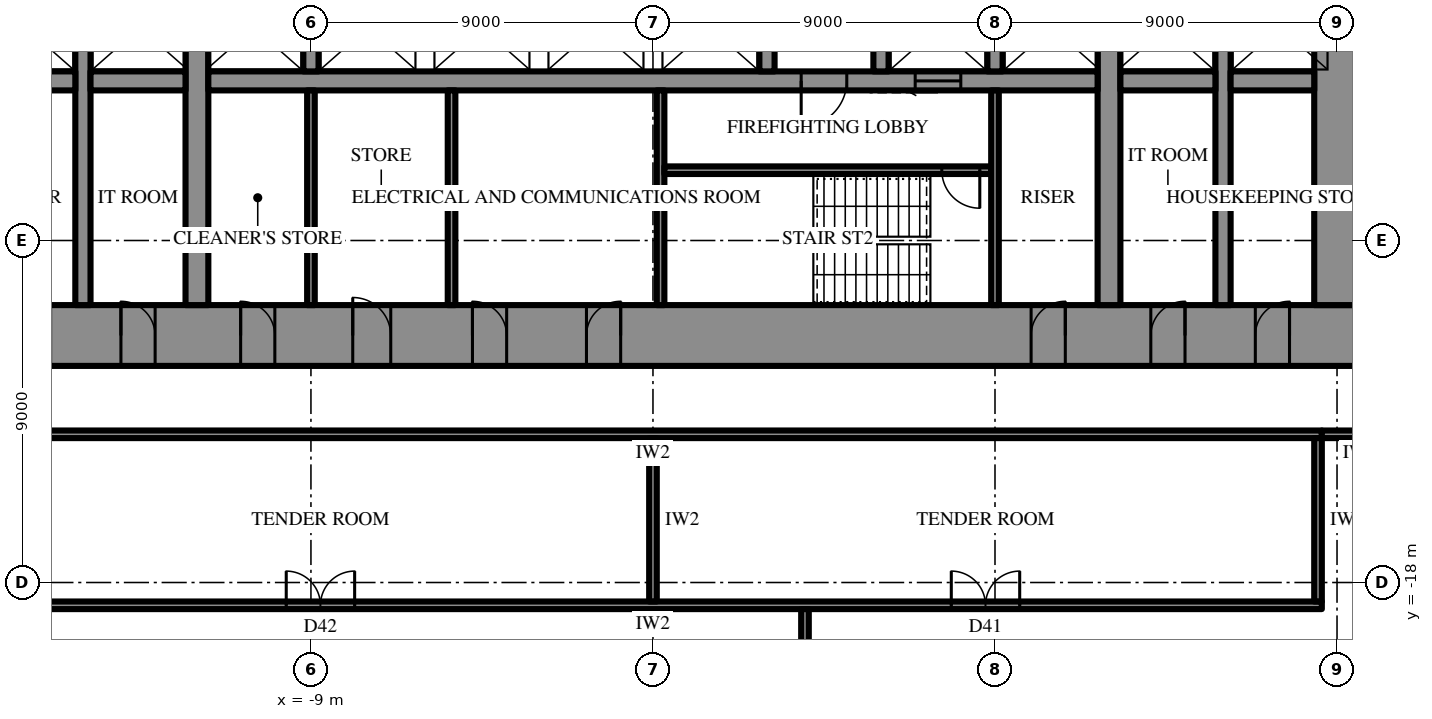
"""IFC4 building model, lengths in metres.
Left out: names, types, materials, properties, quantities, classifications, styles, units other than length and angle.
Written with IfcOpenShell. Run it as: python <this file> out.ifc"""

import sys

from ifc_helpers import new_model, si_unit, direction, frame, frame_2d, origin, place, context, subcontext, project, spatial, rectangle, extrude, element, fill, save


model = new_model("IFC4")
c1 = context("Model", 3, precision=1e-05, world=origin(), true_north=direction((0.0, 1.0)))
c2 = subcontext(c1, "Body", "Model", "MODEL_VIEW")
j1 = project(units=[si_unit("LENGTHUNIT", "METRE"), si_unit("PLANEANGLEUNIT", "RADIAN")], contexts=[c1])
p1 = place(None, origin())
s1 = spatial("IfcSite", under=j1, at=p1, CompositionType="ELEMENT")
p2 = place(p1, origin())
s2 = spatial("IfcBuilding", under=s1, at=p2, CompositionType="ELEMENT")
p3 = place(p2, frame((0.0, 0.0, 69.7)))
s3 = spatial("IfcBuildingStorey", under=s2, at=p3, CompositionType="ELEMENT", Elevation=69.7)
p4 = place(p3, frame((18.6, -11.5, 0.0), z_axis=(0.0, 0.0, 1.0), x_axis=(-1.0, 0.0, 0.0)))
e1 = element("IfcWall", 1, at=p4, inside=s3, PredefinedType="SHEAR", context=c2, shape_type="SweptSolid", body=[
    extrude(rectangle(XDim=37.2, YDim=1.6, at=frame_2d((18.6, 0.0))), origin(), (0.0, 0.0, 1.0), 4.2),
])
p5 = place(p4, frame((19.45, 0.0, 0.0)))
e2 = element("IfcOpeningElement", 2, at=p5, cuts=e1, PredefinedType="OPENING", context=c2, shape_type="SweptSolid", body=[
    extrude(rectangle(XDim=0.9, YDim=2.2, at=frame_2d((0.45, 1.1))), frame((0.0, 0.81, 0.0), z_axis=(0.0, -1.0, 0.0), x_axis=(1.0, 0.0, 0.0)), (0.0, 0.0, 1.0), 1.62),
])
p6 = place(p4, frame((22.45, 0.0, 0.0)))
e3 = element("IfcOpeningElement", 3, at=p6, cuts=e1, PredefinedType="OPENING", context=c2, shape_type="SweptSolid", body=[
    extrude(rectangle(XDim=0.9, YDim=2.2, at=frame_2d((0.45, 1.1))), frame((0.0, 0.81, 0.0), z_axis=(0.0, -1.0, 0.0), x_axis=(1.0, 0.0, 0.0)), (0.0, 0.0, 1.0), 1.62),
])
p7 = place(p4, frame((25.5, 0.0, 0.0)))
e4 = element("IfcOpeningElement", 4, at=p7, cuts=e1, PredefinedType="OPENING", context=c2, shape_type="SweptSolid", body=[
    extrude(rectangle(XDim=1.0, YDim=2.2, at=frame_2d((0.5, 1.1))), frame((0.0, 0.81, 0.0), z_axis=(0.0, -1.0, 0.0), x_axis=(1.0, 0.0, 0.0)), (0.0, 0.0, 1.0), 1.62),
])
p8 = place(p4, frame((1.85, 0.0, 0.0)))
e5 = element("IfcOpeningElement", 5, at=p8, cuts=e1, PredefinedType="OPENING", context=c2, shape_type="SweptSolid", body=[
    extrude(rectangle(XDim=0.9, YDim=2.2, at=frame_2d((0.45, 1.1))), frame((0.0, 0.81, 0.0), z_axis=(0.0, -1.0, 0.0), x_axis=(1.0, 0.0, 0.0)), (0.0, 0.0, 1.0), 1.62),
])
p9 = place(p4, frame((4.6, 0.0, 0.0)))
e6 = element("IfcOpeningElement", 6, at=p9, cuts=e1, PredefinedType="OPENING", context=c2, shape_type="SweptSolid", body=[
    extrude(rectangle(XDim=0.9, YDim=2.2, at=frame_2d((0.45, 1.1))), frame((0.0, 0.81, 0.0), z_axis=(0.0, -1.0, 0.0), x_axis=(1.0, 0.0, 0.0)), (0.0, 0.0, 1.0), 1.62),
])
p10 = place(p4, frame((7.75, 0.0, 0.0)))
e7 = element("IfcOpeningElement", 7, at=p10, cuts=e1, PredefinedType="OPENING", context=c2, shape_type="SweptSolid", body=[
    extrude(rectangle(XDim=0.9, YDim=2.2, at=frame_2d((0.45, 1.1))), frame((0.0, 0.81, 0.0), z_axis=(0.0, -1.0, 0.0), x_axis=(1.0, 0.0, 0.0)), (0.0, 0.0, 1.0), 1.62),
])
p11 = place(p4, frame((28.55, 0.0, 0.0)))
e8 = element("IfcOpeningElement", 8, at=p11, cuts=e1, PredefinedType="OPENING", context=c2, shape_type="SweptSolid", body=[
    extrude(rectangle(XDim=0.9, YDim=2.2, at=frame_2d((0.45, 1.1))), frame((0.0, 0.81, 0.0), z_axis=(0.0, -1.0, 0.0), x_axis=(1.0, 0.0, 0.0)), (0.0, 0.0, 1.0), 1.62),
])
p12 = place(p4, frame((31.7, 0.0, 0.0)))
e9 = element("IfcOpeningElement", 9, at=p12, cuts=e1, PredefinedType="OPENING", context=c2, shape_type="SweptSolid", body=[
    extrude(rectangle(XDim=0.9, YDim=2.2, at=frame_2d((0.45, 1.1))), frame((0.0, 0.81, 0.0), z_axis=(0.0, -1.0, 0.0), x_axis=(1.0, 0.0, 0.0)), (0.0, 0.0, 1.0), 1.62),
])
p13 = place(p4, frame((34.45, 0.0, 0.0)))
e10 = element("IfcOpeningElement", 10, at=p13, cuts=e1, PredefinedType="OPENING", context=c2, shape_type="SweptSolid", body=[
    extrude(rectangle(XDim=0.9, YDim=2.2, at=frame_2d((0.45, 1.1))), frame((0.0, 0.81, 0.0), z_axis=(0.0, -1.0, 0.0), x_axis=(1.0, 0.0, 0.0)), (0.0, 0.0, 1.0), 1.62),
])
p14 = place(p3, frame((18.0, -10.7, 0.0), z_axis=(0.0, 0.0, 1.0), x_axis=(0.0, 1.0, 0.0)))
e11 = element("IfcWall", 11, at=p14, inside=s3, PredefinedType="SHEAR", context=c2, shape_type="SweptSolid", body=[
    extrude(rectangle(XDim=21.4, YDim=1.2, at=frame_2d((10.7, 0.0))), origin(), (0.0, 0.0, 1.0), 4.2),
])
p15 = place(p14, frame((9.8, 0.0, 0.0)))
e12 = element("IfcOpeningElement", 12, at=p15, cuts=e11, PredefinedType="OPENING", context=c2, shape_type="SweptSolid", body=[
    extrude(rectangle(XDim=1.8, YDim=2.4, at=frame_2d((0.9, 1.2))), frame((0.0, 0.61, 0.0), z_axis=(0.0, -1.0, 0.0), x_axis=(1.0, 0.0, 0.0)), (0.0, 0.0, 1.0), 1.22),
])
p16 = place(p3, frame((12.0, -10.7, 0.0), z_axis=(0.0, 0.0, 1.0), x_axis=(0.0, 1.0, 0.0)))
e13 = element("IfcWall", 13, at=p16, inside=s3, PredefinedType="SHEAR", context=c2, shape_type="SweptSolid", body=[
    extrude(rectangle(XDim=21.4, YDim=0.6, at=frame_2d((10.7, 0.0))), origin(), (0.0, 0.0, 1.0), 4.2),
])
p17 = place(p16, frame((9.8, 0.0, 0.0)))
e14 = element("IfcOpeningElement", 14, at=p17, cuts=e13, PredefinedType="OPENING", context=c2, shape_type="SweptSolid", body=[
    extrude(rectangle(XDim=1.8, YDim=2.4, at=frame_2d((0.9, 1.2))), frame((0.0, 0.31, 0.0), z_axis=(0.0, -1.0, 0.0), x_axis=(1.0, 0.0, 0.0)), (0.0, 0.0, 1.0), 0.62),
])
p18 = place(p3, frame((-12.0, -10.7, 0.0), z_axis=(0.0, 0.0, 1.0), x_axis=(0.0, 1.0, 0.0)))
e15 = element("IfcWall", 15, at=p18, inside=s3, PredefinedType="SHEAR", context=c2, shape_type="SweptSolid", body=[
    extrude(rectangle(XDim=21.4, YDim=0.6, at=frame_2d((10.7, 0.0))), origin(), (0.0, 0.0, 1.0), 4.2),
])
p19 = place(p18, frame((9.8, 0.0, 0.0)))
e16 = element("IfcOpeningElement", 16, at=p19, cuts=e15, PredefinedType="OPENING", context=c2, shape_type="SweptSolid", body=[
    extrude(rectangle(XDim=1.8, YDim=2.4, at=frame_2d((0.9, 1.2))), frame((0.0, 0.31, 0.0), z_axis=(0.0, -1.0, 0.0), x_axis=(1.0, 0.0, 0.0)), (0.0, 0.0, 1.0), 0.62),
])
p20 = place(p3, frame((15.0, -10.7, 0.0), z_axis=(0.0, 0.0, 1.0), x_axis=(0.0, 1.0, 0.0)))
e17 = element("IfcWall", 17, at=p20, inside=s3, PredefinedType="SHEAR", context=c2, shape_type="SweptSolid", body=[
    extrude(rectangle(XDim=21.4, YDim=0.4, at=frame_2d((10.7, 0.0))), origin(), (0.0, 0.0, 1.0), 4.2),
])
p21 = place(p20, frame((9.8, 0.0, 0.0)))
e18 = element("IfcOpeningElement", 18, at=p21, cuts=e17, PredefinedType="OPENING", context=c2, shape_type="SweptSolid", body=[
    extrude(rectangle(XDim=1.8, YDim=2.4, at=frame_2d((0.9, 1.2))), frame((0.0, 0.21, 0.0), z_axis=(0.0, -1.0, 0.0), x_axis=(1.0, 0.0, 0.0)), (0.0, 0.0, 1.0), 0.42),
])
p22 = place(p3, frame((-15.0, -10.7, 0.0), z_axis=(0.0, 0.0, 1.0), x_axis=(0.0, 1.0, 0.0)))
e19 = element("IfcWall", 19, at=p22, inside=s3, PredefinedType="SHEAR", context=c2, shape_type="SweptSolid", body=[
    extrude(rectangle(XDim=21.4, YDim=0.4, at=frame_2d((10.7, 0.0))), origin(), (0.0, 0.0, 1.0), 4.2),
])
p23 = place(p22, frame((9.8, 0.0, 0.0)))
e20 = element("IfcOpeningElement", 20, at=p23, cuts=e19, PredefinedType="OPENING", context=c2, shape_type="SweptSolid", body=[
    extrude(rectangle(XDim=1.8, YDim=2.4, at=frame_2d((0.9, 1.2))), frame((0.0, 0.21, 0.0), z_axis=(0.0, -1.0, 0.0), x_axis=(1.0, 0.0, 0.0)), (0.0, 0.0, 1.0), 0.42),
])
p24 = place(p3, frame((17.4, -4.8, 0.0), z_axis=(0.0, 0.0, 1.0), x_axis=(-1.0, 0.0, 0.0)))
e21 = element("IfcWall", 21, at=p24, inside=s3, PredefinedType="SHEAR", context=c2, shape_type="SweptSolid", body=[
    extrude(rectangle(XDim=2.2, YDim=0.5, at=frame_2d((1.1, 0.0))), origin(), (0.0, 0.0, 1.0), 4.2),
])
p25 = place(p3, frame((14.8, -4.8, 0.0), z_axis=(0.0, 0.0, 1.0), x_axis=(-1.0, 0.0, 0.0)))
e22 = element("IfcWall", 22, at=p25, inside=s3, PredefinedType="SHEAR", context=c2, shape_type="SweptSolid", body=[
    extrude(rectangle(XDim=2.5, YDim=0.5, at=frame_2d((1.25, 0.0))), origin(), (0.0, 0.0, 1.0), 4.2),
])
p26 = place(p3, frame((11.7, -4.8, 0.0), z_axis=(0.0, 0.0, 1.0), x_axis=(-1.0, 0.0, 0.0)))
e23 = element("IfcWall", 23, at=p26, inside=s3, PredefinedType="SHEAR", context=c2, shape_type="SweptSolid", body=[
    extrude(rectangle(XDim=23.4, YDim=0.5, at=frame_2d((11.7, 0.0))), origin(), (0.0, 0.0, 1.0), 4.2),
])
p27 = place(p26, frame((6.6, 0.0, 0.0)))
e24 = element("IfcOpeningElement", 24, at=p27, cuts=e23, PredefinedType="OPENING", context=c2, shape_type="SweptSolid", body=[
    extrude(rectangle(XDim=1.2, YDim=2.2, at=frame_2d((0.6, 1.1))), frame((0.0, 0.26, 0.0), z_axis=(0.0, -1.0, 0.0), x_axis=(1.0, 0.0, 0.0)), (0.0, 0.0, 1.0), 0.52),
])
p28 = place(p26, frame((3.6, 0.0, 0.0)))
e25 = element("IfcOpeningElement", 25, at=p28, cuts=e23, PredefinedType="OPENING", context=c2, shape_type="SweptSolid", body=[
    extrude(rectangle(XDim=1.2, YDim=2.2, at=frame_2d((0.6, 1.1))), frame((0.0, 0.26, 0.0), z_axis=(0.0, -1.0, 0.0), x_axis=(1.0, 0.0, 0.0)), (0.0, 0.0, 1.0), 0.52),
])
p29 = place(p3, frame((-12.3, -4.8, 0.0), z_axis=(0.0, 0.0, 1.0), x_axis=(-1.0, 0.0, 0.0)))
e26 = element("IfcWall", 26, at=p29, inside=s3, PredefinedType="SHEAR", context=c2, shape_type="SweptSolid", body=[
    extrude(rectangle(XDim=2.5, YDim=0.5, at=frame_2d((1.25, 0.0))), origin(), (0.0, 0.0, 1.0), 4.2),
])
p30 = place(p3, frame((-15.2, -4.8, 0.0), z_axis=(0.0, 0.0, 1.0), x_axis=(-1.0, 0.0, 0.0)))
e27 = element("IfcWall", 27, at=p30, inside=s3, PredefinedType="SHEAR", context=c2, shape_type="SweptSolid", body=[
    extrude(rectangle(XDim=2.2, YDim=0.5, at=frame_2d((1.1, 0.0))), origin(), (0.0, 0.0, 1.0), 4.2),
])
for number, where, z_axis, x_axis in (
    (28, (9.0, -2.25, 0.0), (0.0, 0.0, 1.0), (0.0, -1.0, 0.0)),
    (29, (6.0, -2.25, 0.0), (0.0, 0.0, 1.0), (0.0, -1.0, 0.0)),
    (30, (3.0, -2.25, 0.0), (0.0, 0.0, 1.0), (0.0, -1.0, 0.0)),
    (31, (-9.0, -2.25, 0.0), (0.0, 0.0, 1.0), (0.0, -1.0, 0.0)),
):
    element("IfcWall", number, at=place(p3, frame(where, z_axis=z_axis, x_axis=x_axis)), inside=s3, PredefinedType="SHEAR", context=c2, shape_type="SweptSolid", body=[
        extrude(rectangle(XDim=2.3, YDim=0.4, at=frame_2d((1.15, 0.0))), origin(), (0.0, 0.0, 1.0), 4.2),
    ])
p31 = place(p3, frame((0.2, -5.05, 0.0), z_axis=(0.0, 0.0, 1.0), x_axis=(0.0, -1.0, 0.0)))
e32 = element("IfcWall", 32, at=p31, inside=s3, PredefinedType="SHEAR", context=c2, shape_type="SweptSolid", body=[
    extrude(rectangle(XDim=5.65, YDim=0.2, at=frame_2d((2.825, 0.0))), origin(), (0.0, 0.0, 1.0), 4.2),
])
p32 = place(p3, frame((8.9, -7.15, 0.0), z_axis=(0.0, 0.0, 1.0), x_axis=(-1.0, 0.0, 0.0)))
e33 = element("IfcWall", 33, at=p32, inside=s3, PredefinedType="SHEAR", context=c2, shape_type="SweptSolid", body=[
    extrude(rectangle(XDim=8.6, YDim=0.2, at=frame_2d((4.3, 0.0))), origin(), (0.0, 0.0, 1.0), 4.2),
])
p33 = place(p32, frame((0.3, 0.0, 0.0)))
e34 = element("IfcOpeningElement", 34, at=p33, cuts=e33, PredefinedType="OPENING", context=c2, shape_type="SweptSolid", body=[
    extrude(rectangle(XDim=1.0, YDim=2.2, at=frame_2d((0.5, 1.1))), frame((0.0, 0.11, 0.0), z_axis=(0.0, -1.0, 0.0), x_axis=(1.0, 0.0, 0.0)), (0.0, 0.0, 1.0), 0.22),
])
for number, where, z_axis, x_axis in (
    (35, (9.0, -5.05, 0.0), (0.0, 0.0, 1.0), (0.0, -1.0, 0.0)),
    (36, (-9.0, -5.05, 0.0), (0.0, 0.0, 1.0), (0.0, -1.0, 0.0)),
    (37, (-5.3, -5.05, 0.0), (0.0, 0.0, 1.0), (0.0, -1.0, 0.0)),
):
    element("IfcWall", number, at=place(p3, frame(where, z_axis=z_axis, x_axis=x_axis)), inside=s3, PredefinedType="PARTITIONING", context=c2, shape_type="SweptSolid", body=[
        extrude(rectangle(XDim=5.65, YDim=0.2, at=frame_2d((2.825, 0.0))), origin(), (0.0, 0.0, 1.0), 4.0),
    ])
p34 = place(p3, frame((17.6, -14.1, 0.0), z_axis=(0.0, 0.0, 1.0), x_axis=(-1.0, 0.0, 0.0)))
e38 = element("IfcWall", 38, at=p34, inside=s3, PredefinedType="PARTITIONING", context=c2, shape_type="SweptSolid", body=[
    extrude(rectangle(XDim=35.2, YDim=0.2, at=frame_2d((17.6, 0.0))), origin(), (0.0, 0.0, 1.0), 4.0),
])
p35 = place(p3, frame((17.6, -18.6, 0.0), z_axis=(0.0, 0.0, 1.0), x_axis=(-1.0, 0.0, 0.0)))
e39 = element("IfcWall", 39, at=p35, inside=s3, PredefinedType="PARTITIONING", context=c2, shape_type="SweptSolid", body=[
    extrude(rectangle(XDim=35.2, YDim=0.2, at=frame_2d((17.6, 0.0))), origin(), (0.0, 0.0, 1.0), 4.0),
])
p36 = place(p35, frame((7.95, 0.0, 0.0)))
e40 = element("IfcOpeningElement", 40, at=p36, cuts=e39, PredefinedType="OPENING", context=c2, shape_type="SweptSolid", body=[
    extrude(rectangle(XDim=1.8, YDim=2.4, at=frame_2d((0.9, 1.2))), frame((0.0, 0.11, 0.0), z_axis=(0.0, -1.0, 0.0), x_axis=(1.0, 0.0, 0.0)), (0.0, 0.0, 1.0), 0.22),
])
p37 = place(p35, frame((25.45, 0.0, 0.0)))
e41 = element("IfcOpeningElement", 41, at=p37, cuts=e39, PredefinedType="OPENING", context=c2, shape_type="SweptSolid", body=[
    extrude(rectangle(XDim=1.8, YDim=2.4, at=frame_2d((0.9, 1.2))), frame((0.0, 0.11, 0.0), z_axis=(0.0, -1.0, 0.0), x_axis=(1.0, 0.0, 0.0)), (0.0, 0.0, 1.0), 0.22),
])
p38 = place(p3, frame((17.5, -14.2, 0.0), z_axis=(0.0, 0.0, 1.0), x_axis=(0.0, -1.0, 0.0)))
e42 = element("IfcWall", 42, at=p38, inside=s3, PredefinedType="PARTITIONING", context=c2, shape_type="SweptSolid", body=[
    extrude(rectangle(XDim=4.3, YDim=0.2, at=frame_2d((2.15, 0.0))), origin(), (0.0, 0.0, 1.0), 4.0),
])
p39 = place(p3, frame((0.0, -14.2, 0.0), z_axis=(0.0, 0.0, 1.0), x_axis=(0.0, -1.0, 0.0)))
e43 = element("IfcWall", 43, at=p39, inside=s3, PredefinedType="PARTITIONING", context=c2, shape_type="SweptSolid", body=[
    extrude(rectangle(XDim=4.3, YDim=0.2, at=frame_2d((2.15, 0.0))), origin(), (0.0, 0.0, 1.0), 2.944),
])
p40 = place(p3, frame((19.6, -14.1, 0.0), z_axis=(0.0, 0.0, 1.0), x_axis=(-1.0, 0.0, 0.0)))
e44 = element("IfcWall", 44, at=p40, inside=s3, PredefinedType="PARTITIONING", context=c2, shape_type="SweptSolid", body=[
    extrude(rectangle(XDim=2.0, YDim=0.2, at=frame_2d((1.0, 0.0))), origin(), (0.0, 0.0, 1.0), 4.0),
])
p41 = place(p3, frame((4.0, -18.7, 0.0), z_axis=(0.0, 0.0, 1.0), x_axis=(0.0, -1.0, 0.0)))
e45 = element("IfcWall", 45, at=p41, inside=s3, PredefinedType="PARTITIONING", context=c2, shape_type="SweptSolid", body=[
    extrude(rectangle(XDim=15.1, YDim=0.2, at=frame_2d((7.55, 0.0))), origin(), (0.0, 0.0, 1.0), 4.0),
])
p42 = place(p41, frame((1.01, 0.0, 0.0)))
e46 = element("IfcOpeningElement", 46, at=p42, cuts=e45, PredefinedType="OPENING", context=c2, shape_type="SweptSolid", body=[
    extrude(rectangle(XDim=1.0, YDim=2.2, at=frame_2d((0.5, 1.1))), frame((0.0, 0.11, 0.0), z_axis=(0.0, -1.0, 0.0), x_axis=(1.0, 0.0, 0.0)), (0.0, 0.0, 1.0), 0.22),
])
p43 = place(p27, origin())
e47 = element("IfcDoor", 47, at=p43, inside=s3, OperationType="SINGLE_SWING_LEFT", PredefinedType="DOOR", context=c2, shape_type="SweptSolid", body=[
    extrude(rectangle(XDim=1.2, YDim=2.2, at=frame_2d((0.6, 1.1))), frame((0.0, 0.025, 0.0), z_axis=(0.0, -1.0, 0.0), x_axis=(1.0, 0.0, 0.0)), (0.0, 0.0, 1.0), 0.05),
])
fill(e24, e47)
p44 = place(p33, origin())
e48 = element("IfcDoor", 48, at=p44, inside=s3, OperationType="SINGLE_SWING_RIGHT", PredefinedType="DOOR", context=c2, shape_type="SweptSolid", body=[
    extrude(rectangle(XDim=1.0, YDim=2.2, at=frame_2d((0.5, 1.1))), frame((0.0, 0.025, 0.0), z_axis=(0.0, -1.0, 0.0), x_axis=(1.0, 0.0, 0.0)), (0.0, 0.0, 1.0), 0.05),
])
fill(e34, e48)
p45 = place(p5, frame((0.9, 0.0, 0.0), z_axis=(0.0, 0.0, 1.0), x_axis=(-1.0, 0.0, 0.0)))
e49 = element("IfcDoor", 49, at=p45, inside=s3, OperationType="SINGLE_SWING_LEFT", PredefinedType="DOOR", context=c2, shape_type="SweptSolid", body=[
    extrude(rectangle(XDim=0.9, YDim=2.2, at=frame_2d((0.45, 1.1))), frame((0.0, 0.025, 0.0), z_axis=(0.0, -1.0, 0.0), x_axis=(1.0, 0.0, 0.0)), (0.0, 0.0, 1.0), 0.05),
])
fill(e2, e49)
p46 = place(p6, frame((0.9, 0.0, 0.0), z_axis=(0.0, 0.0, 1.0), x_axis=(-1.0, 0.0, 0.0)))
e50 = element("IfcDoor", 50, at=p46, inside=s3, OperationType="SINGLE_SWING_RIGHT", PredefinedType="DOOR", context=c2, shape_type="SweptSolid", body=[
    extrude(rectangle(XDim=0.9, YDim=2.2, at=frame_2d((0.45, 1.1))), frame((0.0, 0.025, 0.0), z_axis=(0.0, -1.0, 0.0), x_axis=(1.0, 0.0, 0.0)), (0.0, 0.0, 1.0), 0.05),
])
fill(e3, e50)
p47 = place(p7, frame((1.0, 0.0, 0.0), z_axis=(0.0, 0.0, 1.0), x_axis=(-1.0, 0.0, 0.0)))
e51 = element("IfcDoor", 51, at=p47, inside=s3, OperationType="SINGLE_SWING_RIGHT", PredefinedType="DOOR", context=c2, shape_type="SweptSolid", body=[
    extrude(rectangle(XDim=1.0, YDim=2.2, at=frame_2d((0.5, 1.1))), frame((0.0, 0.025, 0.0), z_axis=(0.0, -1.0, 0.0), x_axis=(1.0, 0.0, 0.0)), (0.0, 0.0, 1.0), 0.05),
])
fill(e4, e51)
p48 = place(p8, frame((0.9, 0.0, 0.0), z_axis=(0.0, 0.0, 1.0), x_axis=(-1.0, 0.0, 0.0)))
e52 = element("IfcDoor", 52, at=p48, inside=s3, OperationType="SINGLE_SWING_LEFT", PredefinedType="DOOR", context=c2, shape_type="SweptSolid", body=[
    extrude(rectangle(XDim=0.9, YDim=2.2, at=frame_2d((0.45, 1.1))), frame((0.0, 0.025, 0.0), z_axis=(0.0, -1.0, 0.0), x_axis=(1.0, 0.0, 0.0)), (0.0, 0.0, 1.0), 0.05),
])
fill(e5, e52)
p49 = place(p9, frame((0.9, 0.0, 0.0), z_axis=(0.0, 0.0, 1.0), x_axis=(-1.0, 0.0, 0.0)))
e53 = element("IfcDoor", 53, at=p49, inside=s3, OperationType="SINGLE_SWING_LEFT", PredefinedType="DOOR", context=c2, shape_type="SweptSolid", body=[
    extrude(rectangle(XDim=0.9, YDim=2.2, at=frame_2d((0.45, 1.1))), frame((0.0, 0.025, 0.0), z_axis=(0.0, -1.0, 0.0), x_axis=(1.0, 0.0, 0.0)), (0.0, 0.0, 1.0), 0.05),
])
fill(e6, e53)
p50 = place(p10, frame((0.9, 0.0, 0.0), z_axis=(0.0, 0.0, 1.0), x_axis=(-1.0, 0.0, 0.0)))
e54 = element("IfcDoor", 54, at=p50, inside=s3, OperationType="SINGLE_SWING_LEFT", PredefinedType="DOOR", context=c2, shape_type="SweptSolid", body=[
    extrude(rectangle(XDim=0.9, YDim=2.2, at=frame_2d((0.45, 1.1))), frame((0.0, 0.025, 0.0), z_axis=(0.0, -1.0, 0.0), x_axis=(1.0, 0.0, 0.0)), (0.0, 0.0, 1.0), 0.05),
])
fill(e7, e54)
p51 = place(p11, frame((0.9, 0.0, 0.0), z_axis=(0.0, 0.0, 1.0), x_axis=(-1.0, 0.0, 0.0)))
e55 = element("IfcDoor", 55, at=p51, inside=s3, OperationType="SINGLE_SWING_RIGHT", PredefinedType="DOOR", context=c2, shape_type="SweptSolid", body=[
    extrude(rectangle(XDim=0.9, YDim=2.2, at=frame_2d((0.45, 1.1))), frame((0.0, 0.025, 0.0), z_axis=(0.0, -1.0, 0.0), x_axis=(1.0, 0.0, 0.0)), (0.0, 0.0, 1.0), 0.05),
])
fill(e8, e55)
p52 = place(p12, frame((0.9, 0.0, 0.0), z_axis=(0.0, 0.0, 1.0), x_axis=(-1.0, 0.0, 0.0)))
e56 = element("IfcDoor", 56, at=p52, inside=s3, OperationType="SINGLE_SWING_RIGHT", PredefinedType="DOOR", context=c2, shape_type="SweptSolid", body=[
    extrude(rectangle(XDim=0.9, YDim=2.2, at=frame_2d((0.45, 1.1))), frame((0.0, 0.025, 0.0), z_axis=(0.0, -1.0, 0.0), x_axis=(1.0, 0.0, 0.0)), (0.0, 0.0, 1.0), 0.05),
])
fill(e9, e56)
p53 = place(p28, origin())
e57 = element("IfcDoor", 57, at=p53, inside=s3, OperationType="SLIDING_TO_LEFT", PredefinedType="DOOR", context=c2, shape_type="SweptSolid", body=[
    extrude(rectangle(XDim=1.2, YDim=2.2, at=frame_2d((0.6, 1.1))), frame((0.0, 0.025, 0.0), z_axis=(0.0, -1.0, 0.0), x_axis=(1.0, 0.0, 0.0)), (0.0, 0.0, 1.0), 0.05),
])
fill(e25, e57)
p54 = place(p36, frame((1.8, 0.0, 0.0), z_axis=(0.0, 0.0, 1.0), x_axis=(-1.0, 0.0, 0.0)))
e58 = element("IfcDoor", 58, at=p54, inside=s3, OperationType="DOUBLE_DOOR_SINGLE_SWING", PredefinedType="DOOR", context=c2, shape_type="SweptSolid", body=[
    extrude(rectangle(XDim=1.8, YDim=2.4, at=frame_2d((0.9, 1.2))), frame((0.0, 0.025, 0.0), z_axis=(0.0, -1.0, 0.0), x_axis=(1.0, 0.0, 0.0)), (0.0, 0.0, 1.0), 0.05),
])
fill(e40, e58)
p55 = place(p37, frame((1.8, 0.0, 0.0), z_axis=(0.0, 0.0, 1.0), x_axis=(-1.0, 0.0, 0.0)))
e59 = element("IfcDoor", 59, at=p55, inside=s3, OperationType="DOUBLE_DOOR_SINGLE_SWING", PredefinedType="DOOR", context=c2, shape_type="SweptSolid", body=[
    extrude(rectangle(XDim=1.8, YDim=2.4, at=frame_2d((0.9, 1.2))), frame((0.0, 0.025, 0.0), z_axis=(0.0, -1.0, 0.0), x_axis=(1.0, 0.0, 0.0)), (0.0, 0.0, 1.0), 0.05),
])
fill(e41, e59)
save(model, sys.argv[1])
